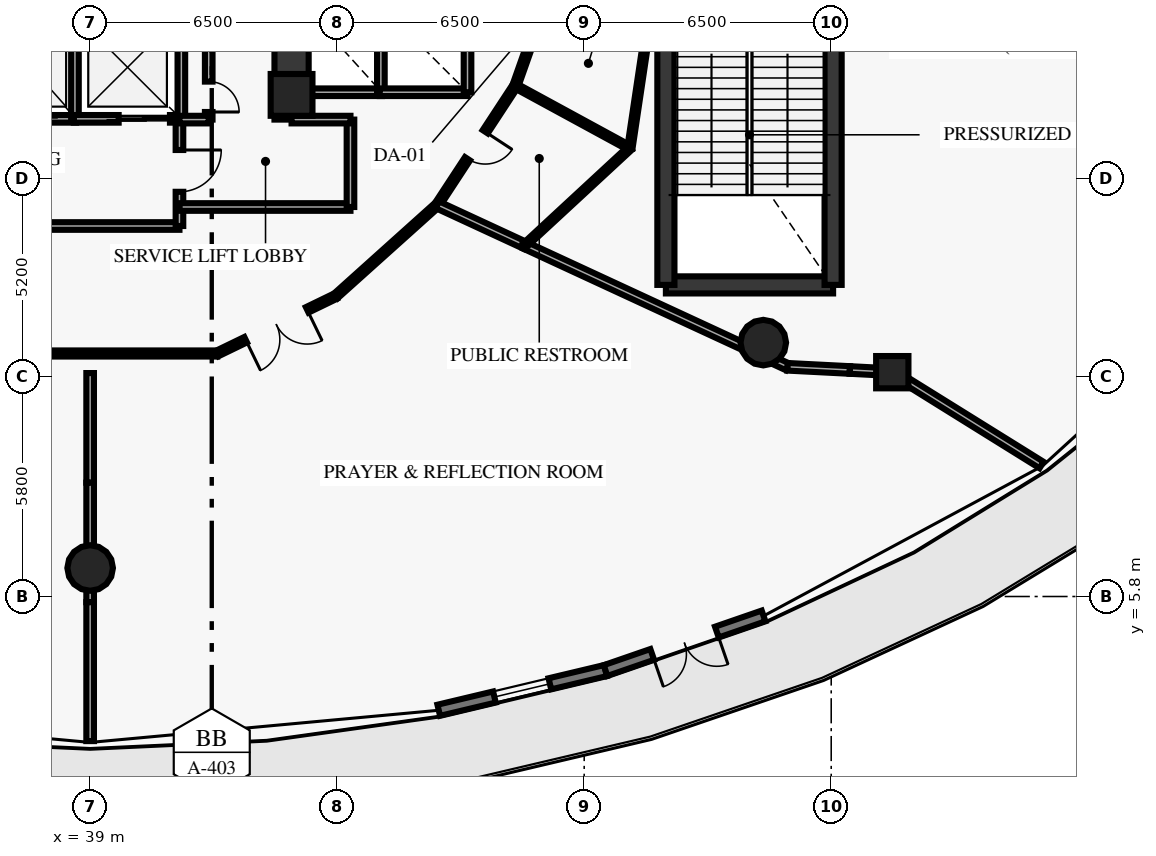
"""IFC4 building model, lengths in metres.
Left out: names, types, materials, properties, quantities, classifications, styles, units other than length and angle.
Written with IfcOpenShell. Run it as: python <this file> out.ifc"""

import sys

from ifc_helpers import new_model, si_unit, direction, frame, frame_2d, origin, origin_2d, place, context, subcontext, project, spatial, rectangle, circle, extrude, element, fill, save


model = new_model("IFC4")
c1 = context("Model", 3, precision=1e-05, world=origin(), true_north=direction((0.0, 1.0)))
c2 = subcontext(c1, "Body", "Model", "MODEL_VIEW")
j1 = project(units=[si_unit("LENGTHUNIT", "METRE"), si_unit("PLANEANGLEUNIT", "RADIAN")], contexts=[c1])
p1 = place(None, origin())
s1 = spatial("IfcSite", under=j1, at=p1, CompositionType="ELEMENT")
p2 = place(p1, origin())
s2 = spatial("IfcBuilding", under=s1, at=p2, CompositionType="ELEMENT")
p3 = place(p2, frame((0.0, 0.0, 11.0)))
s3 = spatial("IfcBuildingStorey", under=s2, at=p3, CompositionType="ELEMENT", Elevation=11.0)
p4 = place(p3, frame((44.3, 19.0, 0.0), z_axis=(0.0, 0.0, 1.0), x_axis=(1.0, 0.0, 0.0)))
e1 = element("IfcColumn", 1, at=p4, inside=s3, PredefinedType="PILASTER", context=c2, shape_type="SweptSolid", body=[
    extrude(rectangle(XDim=1.1, YDim=1.1, at=origin_2d()), origin(), (0.0, 0.0, 1.0), 4.7),
])
for number, where, z_axis, x_axis in (
    (2, (39.0, 6.55, 0.0), (0.0, 0.0, 1.0), (1.0, 0.0, 0.0)),
    (3, (56.713, 12.481, 0.0), (0.0, 0.0, 1.0), (1.0, 0.0, 0.0)),
):
    element("IfcColumn", number, at=place(p3, frame(where, z_axis=z_axis, x_axis=x_axis)), inside=s3, PredefinedType="COLUMN", context=c2, shape_type="SweptSolid", body=[
        extrude(circle(Radius=0.6, at=origin_2d()), origin(), (0.0, 0.0, 1.0), 4.7),
    ])
p5 = place(p3, frame((60.107, 11.703, 0.0), z_axis=(0.0, 0.0, 1.0), x_axis=(1.0, 0.0, 0.0)))
e4 = element("IfcColumn", 4, at=p5, inside=s3, PredefinedType="COLUMN", context=c2, shape_type="SweptSolid", body=[
    extrude(rectangle(XDim=0.85, YDim=0.85, at=origin_2d()), origin(), (0.0, 0.0, 1.0), 4.7),
])
p6 = place(p3, frame((44.3, 18.35, 0.0), z_axis=(0.0, 0.0, 1.0), x_axis=(0.0, 1.0, 0.0)))
e5 = element("IfcWall", 5, at=p6, inside=s3, PredefinedType="SHEAR", context=c2, shape_type="SweptSolid", body=[
    extrude(rectangle(XDim=2.95, YDim=0.9, at=frame_2d((1.475, 0.0))), origin(), (0.0, 0.0, 1.0), 4.7),
])
p7 = place(p3, frame((52.562, 3.851, 0.0), z_axis=(0.0, 0.0, 1.0), x_axis=(-0.972796924046, -0.23165954452, 0.0)))
e6 = element("IfcWall", 6, at=p7, inside=s3, PredefinedType="STANDARD", context=c2, shape_type="SweptSolid", body=[
    extrude(rectangle(XDim=4.512, YDim=0.3, at=frame_2d((2.256, 0.0))), origin(), (0.0, 0.0, 1.0), 4.7),
])
p8 = place(p7, frame((1.506, 0.0, 0.9)))
e7 = element("IfcOpeningElement", 7, at=p8, cuts=e6, PredefinedType="OPENING", context=c2, shape_type="SweptSolid", body=[
    extrude(rectangle(XDim=1.5, YDim=2.2, at=frame_2d((0.75, 1.1))), frame((0.0, 0.16, 0.0), z_axis=(0.0, -1.0, 0.0), x_axis=(1.0, 0.0, 0.0)), (0.0, 0.0, 1.0), 0.32),
])
p9 = place(p3, frame((56.72, 5.288, 0.0), z_axis=(0.0, 0.0, 1.0), x_axis=(-0.945146288822, -0.32664735224, 0.0)))
e8 = element("IfcWall", 8, at=p9, inside=s3, PredefinedType="STANDARD", context=c2, shape_type="SweptSolid", body=[
    extrude(rectangle(XDim=4.399, YDim=0.3, at=frame_2d((2.2, 0.0))), origin(), (0.0, 0.0, 1.0), 4.7),
])
p10 = place(p9, frame((1.3, 0.0, 0.0)))
e9 = element("IfcOpeningElement", 9, at=p10, cuts=e8, PredefinedType="OPENING", context=c2, shape_type="SweptSolid", body=[
    extrude(rectangle(XDim=1.8, YDim=2.25, at=frame_2d((0.9, 1.125))), frame((0.0, 0.16, 0.0), z_axis=(0.0, -1.0, 0.0), x_axis=(1.0, 0.0, 0.0)), (0.0, 0.0, 1.0), 0.32),
])
p11 = place(p3, frame((54.15, 14.0, 0.0), z_axis=(0.0, 0.0, 1.0), x_axis=(1.0, 0.0, 0.0)))
e10 = element("IfcWall", 10, at=p11, inside=s3, PredefinedType="SHEAR", context=c2, shape_type="SweptSolid", body=[
    extrude(rectangle(XDim=4.4, YDim=0.45, at=frame_2d((2.2, 0.0))), origin(), (0.0, 0.0, 1.0), 4.7),
])
for number, where, z_axis, x_axis in (
    (11, (54.15, 14.0, 0.0), (0.0, 0.0, 1.0), (0.0, 1.0, 0.0)),
    (12, (58.55, 14.0, 0.0), (0.0, 0.0, 1.0), (0.0, 1.0, 0.0)),
):
    element("IfcWall", number, at=place(p3, frame(where, z_axis=z_axis, x_axis=x_axis)), inside=s3, PredefinedType="SHEAR", context=c2, shape_type="SweptSolid", body=[
        extrude(rectangle(XDim=7.9, YDim=0.45, at=frame_2d((3.95, 0.0))), origin(), (0.0, 0.0, 1.0), 4.7),
    ])
p12 = place(p3, frame((44.57, 19.07, 0.0), z_axis=(0.0, 0.0, 1.0), x_axis=(1.0, 0.0, 0.0)))
e13 = element("IfcWall", 13, at=p12, inside=s3, PredefinedType="SOLIDWALL", context=c2, shape_type="SweptSolid", body=[
    extrude(rectangle(XDim=2.11, YDim=0.2, at=frame_2d((1.055, 0.0))), origin(), (0.0, 0.0, 1.0), 4.7),
])
for number, where, z_axis, x_axis in (
    (14, (46.65, 19.07, 0.0), (0.0, 0.0, 1.0), (0.0, 1.0, 0.0)),
    (15, (46.62, 19.07, 0.0), (0.0, 0.0, 1.0), (1.0, 0.0, 0.0)),
    (16, (48.93, 19.07, 0.0), (0.0, 0.0, 1.0), (0.0, 1.0, 0.0)),
):
    element("IfcWall", number, at=place(p3, frame(where, z_axis=z_axis, x_axis=x_axis)), inside=s3, PredefinedType="SOLIDWALL", context=c2, shape_type="SweptSolid", body=[
        extrude(rectangle(XDim=2.31, YDim=0.2, at=frame_2d((1.155, 0.0))), origin(), (0.0, 0.0, 1.0), 4.7),
    ])
p13 = place(p3, frame((36.27, 18.37, 0.0), z_axis=(0.0, 0.0, 1.0), x_axis=(1.0, 0.0, 0.0)))
e17 = element("IfcWall", 17, at=p13, inside=s3, PredefinedType="SOLIDWALL", context=c2, shape_type="SweptSolid", body=[
    extrude(rectangle(XDim=2.36, YDim=0.2, at=frame_2d((1.18, 0.0))), origin(), (0.0, 0.0, 1.0), 4.7),
])
p14 = place(p13, frame((0.38, 0.0, 0.0)))
e18 = element("IfcOpeningElement", 18, at=p14, cuts=e17, PredefinedType="OPENING", context=c2, shape_type="SweptSolid", body=[
    extrude(rectangle(XDim=1.25, YDim=2.2, at=frame_2d((0.625, 1.1))), frame((0.0, 0.11, 0.0), z_axis=(0.0, -1.0, 0.0), x_axis=(1.0, 0.0, 0.0)), (0.0, 0.0, 1.0), 0.22),
])
p15 = place(p3, frame((38.6, 18.37, 0.0), z_axis=(0.0, 0.0, 1.0), x_axis=(0.0, 1.0, 0.0)))
e19 = element("IfcWall", 19, at=p15, inside=s3, PredefinedType="SOLIDWALL", context=c2, shape_type="SweptSolid", body=[
    extrude(rectangle(XDim=2.71, YDim=0.2, at=frame_2d((1.355, 0.0))), origin(), (0.0, 0.0, 1.0), 4.7),
])
p16 = place(p3, frame((38.57, 18.37, 0.0), z_axis=(0.0, 0.0, 1.0), x_axis=(1.0, 0.0, 0.0)))
e20 = element("IfcWall", 20, at=p16, inside=s3, PredefinedType="SOLIDWALL", context=c2, shape_type="SweptSolid", body=[
    extrude(rectangle(XDim=2.83, YDim=0.2, at=frame_2d((1.415, 0.0))), origin(), (0.0, 0.0, 1.0), 4.7),
])
p17 = place(p16, frame((1.18, 0.0, 0.0)))
e21 = element("IfcOpeningElement", 21, at=p17, cuts=e20, PredefinedType="OPENING", context=c2, shape_type="SweptSolid", body=[
    extrude(rectangle(XDim=1.35, YDim=2.18, at=frame_2d((0.675, 1.09))), frame((0.0, 0.11, 0.0), z_axis=(0.0, -1.0, 0.0), x_axis=(1.0, 0.0, 0.0)), (0.0, 0.0, 1.0), 0.22),
])
p18 = place(p3, frame((41.4, 18.37, 0.0), z_axis=(0.0, 0.0, 1.0), x_axis=(0.0, 1.0, 0.0)))
e22 = element("IfcWall", 22, at=p18, inside=s3, PredefinedType="SOLIDWALL", context=c2, shape_type="SweptSolid", body=[
    extrude(rectangle(XDim=2.71, YDim=0.2, at=frame_2d((1.355, 0.0))), origin(), (0.0, 0.0, 1.0), 4.7),
])
p19 = place(p3, frame((33.8, 15.55, 0.0), z_axis=(0.0, 0.0, 1.0), x_axis=(1.0, 0.0, 0.0)))
e23 = element("IfcWall", 23, at=p19, inside=s3, PredefinedType="SOLIDWALL", context=c2, shape_type="SweptSolid", body=[
    extrude(rectangle(XDim=7.55, YDim=0.2, at=frame_2d((3.775, 0.0))), origin(), (0.0, 0.0, 1.0), 4.7),
])
p20 = place(p3, frame((41.35, 15.55, 0.0), z_axis=(0.0, 0.0, 1.0), x_axis=(0.0, 1.0, 0.0)))
e24 = element("IfcWall", 24, at=p20, inside=s3, PredefinedType="SOLIDWALL", context=c2, shape_type="SweptSolid", body=[
    extrude(rectangle(XDim=2.8, YDim=0.2, at=frame_2d((1.4, 0.0))), origin(), (0.0, 0.0, 1.0), 4.7),
])
p21 = place(p20, frame((0.9, 0.0, 0.0)))
e25 = element("IfcOpeningElement", 25, at=p21, cuts=e24, PredefinedType="OPENING", context=c2, shape_type="SweptSolid", body=[
    extrude(rectangle(XDim=1.1, YDim=2.15, at=frame_2d((0.55, 1.075))), frame((0.0, 0.11, 0.0), z_axis=(0.0, -1.0, 0.0), x_axis=(1.0, 0.0, 0.0)), (0.0, 0.0, 1.0), 0.22),
])
p22 = place(p3, frame((41.35, 16.05, 0.0), z_axis=(0.0, 0.0, 1.0), x_axis=(1.0, 0.0, 0.0)))
e26 = element("IfcWall", 26, at=p22, inside=s3, PredefinedType="SOLIDWALL", context=c2, shape_type="SweptSolid", body=[
    extrude(rectangle(XDim=4.5, YDim=0.2, at=frame_2d((2.25, 0.0))), origin(), (0.0, 0.0, 1.0), 4.7),
])
p23 = place(p3, frame((45.85, 16.05, 0.0), z_axis=(0.0, 0.0, 1.0), x_axis=(0.0, 1.0, 0.0)))
e27 = element("IfcWall", 27, at=p23, inside=s3, PredefinedType="SOLIDWALL", context=c2, shape_type="SweptSolid", body=[
    extrude(rectangle(XDim=2.3, YDim=0.2, at=frame_2d((1.15, 0.0))), origin(), (0.0, 0.0, 1.0), 4.7),
])
p24 = place(p3, frame((44.3, 18.35, 0.0), z_axis=(0.0, 0.0, 1.0), x_axis=(1.0, 0.0, 0.0)))
e28 = element("IfcWall", 28, at=p24, inside=s3, PredefinedType="SOLIDWALL", context=c2, shape_type="SweptSolid", body=[
    extrude(rectangle(XDim=1.55, YDim=0.2, at=frame_2d((0.775, 0.0))), origin(), (0.0, 0.0, 1.0), 4.7),
])
p25 = place(p3, frame((42.12, 18.35, 0.0), z_axis=(0.0, 0.0, 1.0), x_axis=(0.0, 1.0, 0.0)))
e29 = element("IfcWall", 29, at=p25, inside=s3, PredefinedType="SOLIDWALL", context=c2, shape_type="SweptSolid", body=[
    extrude(rectangle(XDim=2.95, YDim=0.2, at=frame_2d((1.475, 0.0))), origin(), (0.0, 0.0, 1.0), 4.7),
])
p26 = place(p25, frame((0.2, 0.0, 0.0)))
e30 = element("IfcOpeningElement", 30, at=p26, cuts=e29, PredefinedType="OPENING", context=c2, shape_type="SweptSolid", body=[
    extrude(rectangle(XDim=0.8, YDim=2.05, at=frame_2d((0.4, 1.025))), frame((0.0, 0.11, 0.0), z_axis=(0.0, -1.0, 0.0), x_axis=(1.0, 0.0, 0.0)), (0.0, 0.0, 1.0), 0.22),
])
p27 = place(p3, frame((41.35, 18.35, 0.0), z_axis=(0.0, 0.0, 1.0), x_axis=(1.0, 0.0, 0.0)))
e31 = element("IfcWall", 31, at=p27, inside=s3, PredefinedType="SOLIDWALL", context=c2, shape_type="SweptSolid", body=[
    extrude(rectangle(XDim=0.77, YDim=0.2, at=frame_2d((0.385, 0.0))), origin(), (0.0, 0.0, 1.0), 4.7),
])
p28 = place(p3, frame((35.656, 12.195, 0.0), z_axis=(0.0, 0.0, 1.0), x_axis=(1.0, 0.0, 0.0)))
e32 = element("IfcWall", 32, at=p28, inside=s3, PredefinedType="PARTITIONING", context=c2, shape_type="SweptSolid", body=[
    extrude(rectangle(XDim=6.688, YDim=0.16, at=frame_2d((3.344, 0.0))), origin(), (0.0, 0.0, 1.0), 4.7),
])
p29 = place(p3, frame((45.46, 13.706, 0.0), z_axis=(0.0, 0.0, 1.0), x_axis=(-0.899789784655, -0.436323668199, 0.0)))
e33 = element("IfcWall", 33, at=p29, inside=s3, PredefinedType="PARTITIONING", context=c2, shape_type="SweptSolid", body=[
    extrude(rectangle(XDim=3.463, YDim=0.16, at=frame_2d((1.731, 0.0))), origin(), (0.0, 0.0, 1.0), 4.7),
])
p30 = place(p29, frame((0.832, 0.0, 0.0)))
e34 = element("IfcOpeningElement", 34, at=p30, cuts=e33, PredefinedType="OPENING", context=c2, shape_type="SweptSolid", body=[
    extrude(rectangle(XDim=1.8, YDim=2.3, at=frame_2d((0.9, 1.15))), frame((0.0, 0.09, 0.0), z_axis=(0.0, -1.0, 0.0), x_axis=(1.0, 0.0, 0.0)), (0.0, 0.0, 1.0), 0.18),
])
p31 = place(p3, frame((45.46, 13.706, 0.0), z_axis=(0.0, 0.0, 1.0), x_axis=(0.744066617248, 0.668105432621, 0.0)))
e35 = element("IfcWall", 35, at=p31, inside=s3, PredefinedType="PARTITIONING", context=c2, shape_type="SweptSolid", body=[
    extrude(rectangle(XDim=3.596, YDim=0.16, at=frame_2d((1.798, 0.0))), origin(), (0.0, 0.0, 1.0), 4.7),
])
p32 = place(p3, frame((50.189, 19.24, 0.0), z_axis=(0.0, 0.0, 1.0), x_axis=(-0.548318837904, -0.836269365694, 0.0)))
e36 = element("IfcWall", 36, at=p32, inside=s3, PredefinedType="PARTITIONING", context=c2, shape_type="SweptSolid", body=[
    extrude(rectangle(XDim=3.744, YDim=0.16, at=frame_2d((1.872, 0.0))), origin(), (0.0, 0.0, 1.0), 4.7),
])
p33 = place(p32, frame((1.447, 0.0, 0.0)))
e37 = element("IfcOpeningElement", 37, at=p33, cuts=e36, PredefinedType="OPENING", context=c2, shape_type="SweptSolid", body=[
    extrude(rectangle(XDim=0.85, YDim=2.1, at=frame_2d((0.425, 1.05))), frame((0.0, 0.09, 0.0), z_axis=(0.0, -1.0, 0.0), x_axis=(1.0, 0.0, 0.0)), (0.0, 0.0, 1.0), 0.18),
])
p34 = place(p3, frame((51.48, 22.887, 0.0), z_axis=(0.0, 0.0, 1.0), x_axis=(-0.333704620558, -0.942677689467, 0.0)))
e38 = element("IfcWall", 38, at=p34, inside=s3, PredefinedType="PARTITIONING", context=c2, shape_type="SweptSolid", body=[
    extrude(rectangle(XDim=3.869, YDim=0.16, at=frame_2d((1.934, 0.0))), origin(), (0.0, 0.0, 1.0), 4.7),
])
p35 = place(p34, frame((1.459, 0.0, 0.0)))
e39 = element("IfcOpeningElement", 39, at=p35, cuts=e38, PredefinedType="OPENING", context=c2, shape_type="SweptSolid", body=[
    extrude(rectangle(XDim=0.95, YDim=2.1, at=frame_2d((0.475, 1.05))), frame((0.0, 0.09, 0.0), z_axis=(0.0, -1.0, 0.0), x_axis=(1.0, 0.0, 0.0)), (0.0, 0.0, 1.0), 0.18),
])
p36 = place(p3, frame((39.0, 11.68, 0.0), z_axis=(0.0, 0.0, 1.0), x_axis=(0.0, -1.0, 0.0)))
e40 = element("IfcWall", 40, at=p36, inside=s3, PredefinedType="PARTITIONING", context=c2, shape_type="SweptSolid", body=[
    extrude(rectangle(XDim=2.885, YDim=0.2, at=frame_2d((1.442, 0.0))), origin(), (0.0, 0.0, 1.0), 4.7),
])
p37 = place(p3, frame((39.0, 8.795, 0.0), z_axis=(0.0, 0.0, 1.0), x_axis=(0.0, -1.0, 0.0)))
e41 = element("IfcWall", 41, at=p37, inside=s3, PredefinedType="PARTITIONING", context=c2, shape_type="SweptSolid", body=[
    extrude(rectangle(XDim=2.259, YDim=0.2, at=frame_2d((1.129, 0.0))), origin(), (0.0, 0.0, 1.0), 3.765),
])
p38 = place(p3, frame((39.0, 6.536, 0.0), z_axis=(0.0, 0.0, 1.0), x_axis=(0.0, -1.0, 0.0)))
e42 = element("IfcWall", 42, at=p38, inside=s3, PredefinedType="PARTITIONING", context=c2, shape_type="SweptSolid", body=[
    extrude(rectangle(XDim=0.886, YDim=0.2, at=frame_2d((0.443, 0.0))), origin(), (0.0, 0.0, 1.0), 4.7),
])
p39 = place(p3, frame((39.0, 5.65, 0.0), z_axis=(0.0, 0.0, 1.0), x_axis=(0.0, -1.0, 0.0)))
e43 = element("IfcWall", 43, at=p39, inside=s3, PredefinedType="PARTITIONING", context=c2, shape_type="SweptSolid", body=[
    extrude(rectangle(XDim=3.655, YDim=0.2, at=frame_2d((1.827, 0.0))), origin(), (0.0, 0.0, 1.0), 4.7),
])
p40 = place(p3, frame((48.136, 16.109, 0.0), z_axis=(0.0, 0.0, 1.0), x_axis=(0.907508335547, -0.420034071133, 0.0)))
e44 = element("IfcWall", 44, at=p40, inside=s3, PredefinedType="PARTITIONING", context=c2, shape_type="SweptSolid", body=[
    extrude(rectangle(XDim=2.538, YDim=0.2, at=frame_2d((1.269, 0.0))), origin(), (0.0, 0.0, 1.0), 4.7),
])
p41 = place(p3, frame((50.439, 15.043, 0.0), z_axis=(0.0, 0.0, 1.0), x_axis=(0.907524397356, -0.419999366908, 0.0)))
e45 = element("IfcWall", 45, at=p41, inside=s3, PredefinedType="PARTITIONING", context=c2, shape_type="SweptSolid", body=[
    extrude(rectangle(XDim=7.614, YDim=0.2, at=frame_2d((3.807, 0.0))), origin(), (0.0, 0.0, 1.0), 4.7),
])
p42 = place(p3, frame((57.349, 11.845, 0.0), z_axis=(0.0, 0.0, 1.0), x_axis=(0.998692725363, -0.051115949639, 0.0)))
e46 = element("IfcWall", 46, at=p42, inside=s3, PredefinedType="PARTITIONING", context=c2, shape_type="SweptSolid", body=[
    extrude(rectangle(XDim=1.643, YDim=0.2, at=frame_2d((0.822, 0.0))), origin(), (0.0, 0.0, 1.0), 4.7),
])
p43 = place(p3, frame((58.99, 11.761, 0.0), z_axis=(0.0, 0.0, 1.0), x_axis=(0.998649603439, -0.051951607785, 0.0)))
e47 = element("IfcWall", 47, at=p43, inside=s3, PredefinedType="PARTITIONING", context=c2, shape_type="SweptSolid", body=[
    extrude(rectangle(XDim=1.118, YDim=0.2, at=frame_2d((0.559, 0.0))), origin(), (0.0, 0.0, 1.0), 4.24),
])
p44 = place(p3, frame((60.107, 11.703, 0.0), z_axis=(0.0, 0.0, 1.0), x_axis=(0.849173378653, -0.528114166623, 0.0)))
e48 = element("IfcWall", 48, at=p44, inside=s3, PredefinedType="PARTITIONING", context=c2, shape_type="SweptSolid", body=[
    extrude(rectangle(XDim=4.626, YDim=0.2, at=frame_2d((2.313, 0.0))), origin(), (0.0, 0.0, 1.0), 4.7),
])
p45 = place(p3, frame((50.189, 19.24, 0.0), z_axis=(0.0, 0.0, 1.0), x_axis=(0.878392721738, -0.477939563541, 0.0)))
e49 = element("IfcWall", 49, at=p45, inside=s3, PredefinedType="PARTITIONING", context=c2, shape_type="SweptSolid", body=[
    extrude(rectangle(XDim=3.431, YDim=0.14, at=frame_2d((1.716, 0.0))), origin(), (0.0, 0.0, 1.0), 4.7),
])
p46 = place(p3, frame((50.439, 15.043, 0.0), z_axis=(0.0, 0.0, 1.0), x_axis=(0.734032370371, 0.679114481695, 0.0)))
e50 = element("IfcWall", 50, at=p46, inside=s3, PredefinedType="PARTITIONING", context=c2, shape_type="SweptSolid", body=[
    extrude(rectangle(XDim=3.765, YDim=0.14, at=frame_2d((1.883, 0.0))), origin(), (0.0, 0.0, 1.0), 4.7),
])
p47 = place(p3, frame((53.203, 17.6, 0.0), z_axis=(0.0, 0.0, 1.0), x_axis=(0.147441370436, 0.989070797407, 0.0)))
e51 = element("IfcWall", 51, at=p47, inside=s3, PredefinedType="PARTITIONING", context=c2, shape_type="SweptSolid", body=[
    extrude(rectangle(XDim=4.728, YDim=0.14, at=frame_2d((2.364, 0.0))), origin(), (0.0, 0.0, 1.0), 4.7),
])
p48 = place(p8, origin())
e52 = element("IfcWindow", 52, at=p48, inside=s3, PartitioningType="DOUBLE_PANEL_VERTICAL", PredefinedType="WINDOW", context=c2, shape_type="SweptSolid", body=[
    extrude(rectangle(XDim=1.5, YDim=2.2, at=frame_2d((0.75, 1.1))), frame((0.0, 0.03, 0.0), z_axis=(0.0, -1.0, 0.0), x_axis=(1.0, 0.0, 0.0)), (0.0, 0.0, 1.0), 0.06),
])
fill(e7, e52)
p49 = place(p10, origin())
e53 = element("IfcDoor", 53, at=p49, inside=s3, OperationType="DOUBLE_DOOR_SINGLE_SWING", PredefinedType="DOOR", context=c2, shape_type="SweptSolid", body=[
    extrude(rectangle(XDim=1.8, YDim=2.25, at=frame_2d((0.9, 1.125))), frame((0.0, 0.025, 0.0), z_axis=(0.0, -1.0, 0.0), x_axis=(1.0, 0.0, 0.0)), (0.0, 0.0, 1.0), 0.05),
])
fill(e9, e53)
p50 = place(p17, origin())
e54 = element("IfcDoor", 54, at=p50, inside=s3, OperationType="DOUBLE_DOOR_SLIDING", PredefinedType="DOOR", context=c2, shape_type="SweptSolid", body=[
    extrude(rectangle(XDim=1.35, YDim=2.18, at=frame_2d((0.675, 1.09))), frame((0.0, 0.025, 0.0), z_axis=(0.0, -1.0, 0.0), x_axis=(1.0, 0.0, 0.0)), (0.0, 0.0, 1.0), 0.05),
])
fill(e21, e54)
p51 = place(p21, origin())
e55 = element("IfcDoor", 55, at=p51, inside=s3, OperationType="SINGLE_SWING_RIGHT", PredefinedType="DOOR", context=c2, shape_type="SweptSolid", body=[
    extrude(rectangle(XDim=1.1, YDim=2.15, at=frame_2d((0.55, 1.075))), frame((0.0, 0.025, 0.0), z_axis=(0.0, -1.0, 0.0), x_axis=(1.0, 0.0, 0.0)), (0.0, 0.0, 1.0), 0.05),
])
fill(e25, e55)
p52 = place(p26, origin())
e56 = element("IfcDoor", 56, at=p52, inside=s3, OperationType="SINGLE_SWING_LEFT", PredefinedType="DOOR", context=c2, shape_type="SweptSolid", body=[
    extrude(rectangle(XDim=0.8, YDim=2.05, at=frame_2d((0.4, 1.025))), frame((0.0, 0.025, 0.0), z_axis=(0.0, -1.0, 0.0), x_axis=(1.0, 0.0, 0.0)), (0.0, 0.0, 1.0), 0.05),
])
fill(e30, e56)
p53 = place(p30, origin())
e57 = element("IfcDoor", 57, at=p53, inside=s3, OperationType="DOUBLE_DOOR_SINGLE_SWING", PredefinedType="DOOR", context=c2, shape_type="SweptSolid", body=[
    extrude(rectangle(XDim=1.8, YDim=2.3, at=frame_2d((0.9, 1.15))), frame((0.0, 0.025, 0.0), z_axis=(0.0, -1.0, 0.0), x_axis=(1.0, 0.0, 0.0)), (0.0, 0.0, 1.0), 0.05),
])
fill(e34, e57)
p54 = place(p33, origin())
e58 = element("IfcDoor", 58, at=p54, inside=s3, OperationType="SINGLE_SWING_LEFT", PredefinedType="DOOR", context=c2, shape_type="SweptSolid", body=[
    extrude(rectangle(XDim=0.85, YDim=2.1, at=frame_2d((0.425, 1.05))), frame((0.0, 0.025, 0.0), z_axis=(0.0, -1.0, 0.0), x_axis=(1.0, 0.0, 0.0)), (0.0, 0.0, 1.0), 0.05),
])
fill(e37, e58)
save(model, sys.argv[1])
